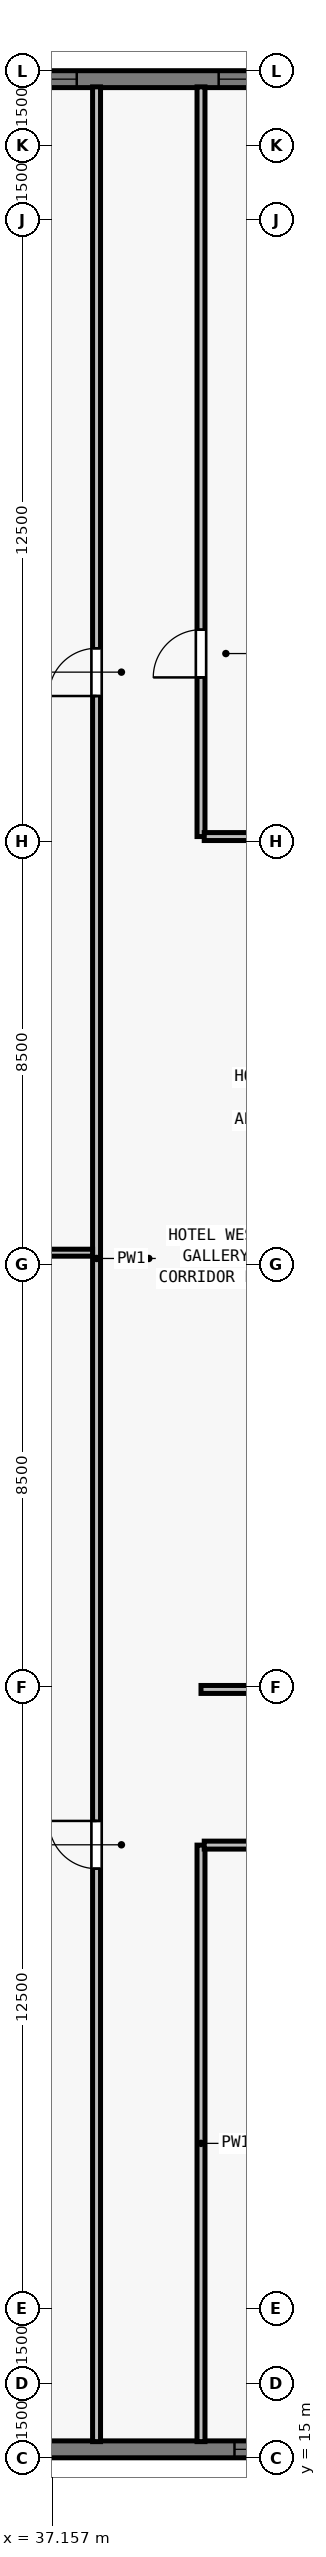
"""IFC4 building model, lengths in metres.
Left out: names, types, materials, properties, quantities, classifications, styles, units other than length and angle.
Written with IfcOpenShell. Run it as: python <this file> out.ifc"""

import sys

from ifc_helpers import new_model, si_unit, direction, frame, frame_2d, origin, place, context, subcontext, project, spatial, rectangle, extrude, element, fill, save


model = new_model("IFC4")
c1 = context("Model", 3, precision=1e-05, world=origin(), true_north=direction((0.0, 1.0)))
c2 = subcontext(c1, "Body", "Model", "MODEL_VIEW")
j1 = project(units=[si_unit("LENGTHUNIT", "METRE"), si_unit("PLANEANGLEUNIT", "RADIAN")], contexts=[c1])
p1 = place(None, origin())
s1 = spatial("IfcSite", under=j1, at=p1, CompositionType="ELEMENT")
p2 = place(p1, origin())
s2 = spatial("IfcBuilding", under=s1, at=p2, CompositionType="ELEMENT")
p3 = place(p2, frame((0.0, 0.0, 179.5)))
s3 = spatial("IfcBuildingStorey", under=s2, at=p3, CompositionType="ELEMENT", Elevation=179.5)
p4 = place(p3, frame((72.0, 15.17, 0.0), z_axis=(0.0, 0.0, 1.0), x_axis=(-1.0, 0.0, 0.0)))
e1 = element("IfcWall", 1, at=p4, inside=s3, PredefinedType="SOLIDWALL", context=c2, shape_type="SweptSolid", body=[
    extrude(rectangle(XDim=39.682, YDim=0.34, at=frame_2d((19.841, 0.0))), origin(), (0.0, 0.0, 1.0), 3.28),
])
p5 = place(p4, frame((11.859, 0.0, 0.8)))
e2 = element("IfcOpeningElement", 2, at=p5, cuts=e1, PredefinedType="OPENING", context=c2, shape_type="SweptSolid", body=[
    extrude(rectangle(XDim=1.75, YDim=1.66, at=frame_2d((0.875, 0.83))), frame((0.0, 0.18, 0.0), z_axis=(0.0, -1.0, 0.0), x_axis=(1.0, 0.0, 0.0)), (0.0, 0.0, 1.0), 0.36),
])
p6 = place(p4, frame((18.966, 0.0, 0.8)))
e3 = element("IfcOpeningElement", 3, at=p6, cuts=e1, PredefinedType="OPENING", context=c2, shape_type="SweptSolid", body=[
    extrude(rectangle(XDim=1.75, YDim=1.66, at=frame_2d((0.875, 0.83))), frame((0.0, 0.18, 0.0), z_axis=(0.0, -1.0, 0.0), x_axis=(1.0, 0.0, 0.0)), (0.0, 0.0, 1.0), 0.36),
])
p7 = place(p4, frame((22.27, 0.0, 0.8)))
e4 = element("IfcOpeningElement", 4, at=p7, cuts=e1, PredefinedType="OPENING", context=c2, shape_type="SweptSolid", body=[
    extrude(rectangle(XDim=1.35, YDim=1.66, at=frame_2d((0.675, 0.83))), frame((0.0, 0.18, 0.0), z_axis=(0.0, -1.0, 0.0), x_axis=(1.0, 0.0, 0.0)), (0.0, 0.0, 1.0), 0.36),
])
p8 = place(p4, frame((26.073, 0.0, 0.8)))
e5 = element("IfcOpeningElement", 5, at=p8, cuts=e1, PredefinedType="OPENING", context=c2, shape_type="SweptSolid", body=[
    extrude(rectangle(XDim=1.75, YDim=1.66, at=frame_2d((0.875, 0.83))), frame((0.0, 0.18, 0.0), z_axis=(0.0, -1.0, 0.0), x_axis=(1.0, 0.0, 0.0)), (0.0, 0.0, 1.0), 0.36),
])
p9 = place(p4, frame((29.827, 0.0, 0.8)))
e6 = element("IfcOpeningElement", 6, at=p9, cuts=e1, PredefinedType="OPENING", context=c2, shape_type="SweptSolid", body=[
    extrude(rectangle(XDim=1.35, YDim=1.66, at=frame_2d((0.675, 0.83))), frame((0.0, 0.18, 0.0), z_axis=(0.0, -1.0, 0.0), x_axis=(1.0, 0.0, 0.0)), (0.0, 0.0, 1.0), 0.36),
])
p10 = place(p3, frame((32.0, 62.83, 0.0), z_axis=(0.0, 0.0, 1.0), x_axis=(1.0, 0.0, 0.0)))
e7 = element("IfcWall", 7, at=p10, inside=s3, PredefinedType="SOLIDWALL", context=c2, shape_type="SweptSolid", body=[
    extrude(rectangle(XDim=39.682, YDim=0.34, at=frame_2d((19.841, 0.0))), origin(), (0.0, 0.0, 1.0), 3.28),
])
p11 = place(p10, frame((3.902, 0.0, 0.8)))
e8 = element("IfcOpeningElement", 8, at=p11, cuts=e7, PredefinedType="OPENING", context=c2, shape_type="SweptSolid", body=[
    extrude(rectangle(XDim=1.75, YDim=1.66, at=frame_2d((0.875, 0.83))), frame((0.0, 0.18, 0.0), z_axis=(0.0, -1.0, 0.0), x_axis=(1.0, 0.0, 0.0)), (0.0, 0.0, 1.0), 0.36),
])
p12 = place(p10, frame((8.505, 0.0, 0.8)))
e9 = element("IfcOpeningElement", 9, at=p12, cuts=e7, PredefinedType="OPENING", context=c2, shape_type="SweptSolid", body=[
    extrude(rectangle(XDim=1.35, YDim=1.66, at=frame_2d((0.675, 0.83))), frame((0.0, 0.18, 0.0), z_axis=(0.0, -1.0, 0.0), x_axis=(1.0, 0.0, 0.0)), (0.0, 0.0, 1.0), 0.36),
])
p13 = place(p10, frame((11.859, 0.0, 0.8)))
e10 = element("IfcOpeningElement", 10, at=p13, cuts=e7, PredefinedType="OPENING", context=c2, shape_type="SweptSolid", body=[
    extrude(rectangle(XDim=1.75, YDim=1.66, at=frame_2d((0.875, 0.83))), frame((0.0, 0.18, 0.0), z_axis=(0.0, -1.0, 0.0), x_axis=(1.0, 0.0, 0.0)), (0.0, 0.0, 1.0), 0.36),
])
p14 = place(p10, frame((16.062, 0.0, 0.8)))
e11 = element("IfcOpeningElement", 11, at=p14, cuts=e7, PredefinedType="OPENING", context=c2, shape_type="SweptSolid", body=[
    extrude(rectangle(XDim=1.35, YDim=1.66, at=frame_2d((0.675, 0.83))), frame((0.0, 0.18, 0.0), z_axis=(0.0, -1.0, 0.0), x_axis=(1.0, 0.0, 0.0)), (0.0, 0.0, 1.0), 0.36),
])
p15 = place(p10, frame((17.716, 0.0, 0.8)))
e12 = element("IfcOpeningElement", 12, at=p15, cuts=e7, PredefinedType="OPENING", context=c2, shape_type="SweptSolid", body=[
    extrude(rectangle(XDim=1.75, YDim=1.66, at=frame_2d((0.875, 0.83))), frame((0.0, 0.18, 0.0), z_axis=(0.0, -1.0, 0.0), x_axis=(1.0, 0.0, 0.0)), (0.0, 0.0, 1.0), 0.36),
])
p16 = place(p10, frame((22.719, 0.0, 0.8)))
e13 = element("IfcOpeningElement", 13, at=p16, cuts=e7, PredefinedType="OPENING", context=c2, shape_type="SweptSolid", body=[
    extrude(rectangle(XDim=1.35, YDim=1.66, at=frame_2d((0.675, 0.83))), frame((0.0, 0.18, 0.0), z_axis=(0.0, -1.0, 0.0), x_axis=(1.0, 0.0, 0.0)), (0.0, 0.0, 1.0), 0.36),
])
p17 = place(p10, frame((26.073, 0.0, 0.8)))
e14 = element("IfcOpeningElement", 14, at=p17, cuts=e7, PredefinedType="OPENING", context=c2, shape_type="SweptSolid", body=[
    extrude(rectangle(XDim=1.75, YDim=1.66, at=frame_2d((0.875, 0.83))), frame((0.0, 0.18, 0.0), z_axis=(0.0, -1.0, 0.0), x_axis=(1.0, 0.0, 0.0)), (0.0, 0.0, 1.0), 0.36),
])
p18 = place(p10, frame((30.677, 0.0, 0.8)))
e15 = element("IfcOpeningElement", 15, at=p18, cuts=e7, PredefinedType="OPENING", context=c2, shape_type="SweptSolid", body=[
    extrude(rectangle(XDim=1.35, YDim=1.66, at=frame_2d((0.675, 0.83))), frame((0.0, 0.18, 0.0), z_axis=(0.0, -1.0, 0.0), x_axis=(1.0, 0.0, 0.0)), (0.0, 0.0, 1.0), 0.36),
])
p19 = place(p10, frame((33.18, 0.0, 0.8)))
e16 = element("IfcOpeningElement", 16, at=p19, cuts=e7, PredefinedType="OPENING", context=c2, shape_type="SweptSolid", body=[
    extrude(rectangle(XDim=1.75, YDim=1.66, at=frame_2d((0.875, 0.83))), frame((0.0, 0.18, 0.0), z_axis=(0.0, -1.0, 0.0), x_axis=(1.0, 0.0, 0.0)), (0.0, 0.0, 1.0), 0.36),
])
p20 = place(p3, frame((38.05, 15.325, 0.0), z_axis=(0.0, 0.0, 1.0), x_axis=(0.0, 1.0, 0.0)))
e17 = element("IfcWall", 17, at=p20, inside=s3, PredefinedType="PARTITIONING", context=c2, shape_type="SweptSolid", body=[
    extrude(rectangle(XDim=47.35, YDim=0.16, at=frame_2d((23.675, 0.0))), origin(), (0.0, 0.0, 1.0), 2.555),
])
p21 = place(p20, frame((11.521, 0.0, 0.0)))
e18 = element("IfcOpeningElement", 18, at=p21, cuts=e17, PredefinedType="OPENING", context=c2, shape_type="SweptSolid", body=[
    extrude(rectangle(XDim=0.96, YDim=2.12, at=frame_2d((0.48, 1.06))), frame((0.0, 0.09, 0.0), z_axis=(0.0, -1.0, 0.0), x_axis=(1.0, 0.0, 0.0)), (0.0, 0.0, 1.0), 0.18),
])
p22 = place(p20, frame((35.101, 0.0, 0.0)))
e19 = element("IfcOpeningElement", 19, at=p22, cuts=e17, PredefinedType="OPENING", context=c2, shape_type="SweptSolid", body=[
    extrude(rectangle(XDim=0.96, YDim=2.12, at=frame_2d((0.48, 1.06))), frame((0.0, 0.09, 0.0), z_axis=(0.0, -1.0, 0.0), x_axis=(1.0, 0.0, 0.0)), (0.0, 0.0, 1.0), 0.18),
])
p23 = place(p3, frame((40.15, 15.325, 0.0), z_axis=(0.0, 0.0, 1.0), x_axis=(0.0, 1.0, 0.0)))
e20 = element("IfcWall", 20, at=p23, inside=s3, PredefinedType="PARTITIONING", context=c2, shape_type="SweptSolid", body=[
    extrude(rectangle(XDim=11.995, YDim=0.16, at=frame_2d((5.998, 0.0))), origin(), (0.0, 0.0, 1.0), 2.555),
])
p24 = place(p3, frame((40.15, 47.6, 0.0), z_axis=(0.0, 0.0, 1.0), x_axis=(0.0, 1.0, 0.0)))
e21 = element("IfcWall", 21, at=p24, inside=s3, PredefinedType="PARTITIONING", context=c2, shape_type="SweptSolid", body=[
    extrude(rectangle(XDim=15.075, YDim=0.16, at=frame_2d((7.538, 0.0))), origin(), (0.0, 0.0, 1.0), 2.555),
])
p25 = place(p24, frame((3.2, 0.0, 0.0)))
e22 = element("IfcOpeningElement", 22, at=p25, cuts=e21, PredefinedType="OPENING", context=c2, shape_type="SweptSolid", body=[
    extrude(rectangle(XDim=0.96, YDim=2.12, at=frame_2d((0.48, 1.06))), frame((0.0, 0.09, 0.0), z_axis=(0.0, -1.0, 0.0), x_axis=(1.0, 0.0, 0.0)), (0.0, 0.0, 1.0), 0.18),
])
p26 = place(p3, frame((40.15, 30.45, 0.0), z_axis=(0.0, 0.0, 1.0), x_axis=(1.0, 0.0, 0.0)))
e23 = element("IfcWall", 23, at=p26, inside=s3, PredefinedType="PARTITIONING", context=c2, shape_type="SweptSolid", body=[
    extrude(rectangle(XDim=3.085, YDim=0.16, at=frame_2d((1.542, 0.0))), origin(), (0.0, 0.0, 1.0), 3.28),
])
p27 = place(p3, frame((40.215, 47.6, 0.0), z_axis=(0.0, 0.0, 1.0), x_axis=(1.0, 0.0, 0.0)))
e24 = element("IfcWall", 24, at=p27, inside=s3, PredefinedType="PARTITIONING", context=c2, shape_type="SweptSolid", body=[
    extrude(rectangle(XDim=3.02, YDim=0.16, at=frame_2d((1.51, 0.0))), origin(), (0.0, 0.0, 1.0), 3.28),
])
p28 = place(p3, frame((40.215, 27.32, 0.0), z_axis=(0.0, 0.0, 1.0), x_axis=(1.0, 0.0, 0.0)))
e25 = element("IfcWall", 25, at=p28, inside=s3, PredefinedType="PARTITIONING", context=c2, shape_type="SweptSolid", body=[
    extrude(rectangle(XDim=22.07, YDim=0.16, at=frame_2d((11.035, 0.0))), origin(), (0.0, 0.0, 1.0), 3.28),
])
p29 = place(p28, frame((3.587, 0.0, 0.0)))
e26 = element("IfcOpeningElement", 26, at=p29, cuts=e25, PredefinedType="OPENING", context=c2, shape_type="SweptSolid", body=[
    extrude(rectangle(XDim=0.96, YDim=2.12, at=frame_2d((0.48, 1.06))), frame((0.0, 0.09, 0.0), z_axis=(0.0, -1.0, 0.0), x_axis=(1.0, 0.0, 0.0)), (0.0, 0.0, 1.0), 0.18),
])
p30 = place(p28, frame((10.61, 0.0, 0.0)))
e27 = element("IfcOpeningElement", 27, at=p30, cuts=e25, PredefinedType="OPENING", context=c2, shape_type="SweptSolid", body=[
    extrude(rectangle(XDim=0.96, YDim=2.12, at=frame_2d((0.48, 1.06))), frame((0.0, 0.09, 0.0), z_axis=(0.0, -1.0, 0.0), x_axis=(1.0, 0.0, 0.0)), (0.0, 0.0, 1.0), 0.18),
])
p31 = place(p28, frame((17.578, 0.0, 0.0)))
e28 = element("IfcOpeningElement", 28, at=p31, cuts=e25, PredefinedType="OPENING", context=c2, shape_type="SweptSolid", body=[
    extrude(rectangle(XDim=0.96, YDim=2.12, at=frame_2d((0.48, 1.06))), frame((0.0, 0.09, 0.0), z_axis=(0.0, -1.0, 0.0), x_axis=(1.0, 0.0, 0.0)), (0.0, 0.0, 1.0), 0.18),
])
p32 = place(p3, frame((28.42, 39.232, 0.0), z_axis=(0.0, 0.0, 1.0), x_axis=(1.0, 0.0, 0.0)))
e29 = element("IfcWall", 29, at=p32, inside=s3, PredefinedType="PARTITIONING", context=c2, shape_type="SweptSolid", body=[
    extrude(rectangle(XDim=9.55, YDim=0.14, at=frame_2d((4.775, 0.0))), origin(), (0.0, 0.0, 1.0), 2.896),
])
p33 = place(p9, origin())
e30 = element("IfcWindow", 30, at=p33, inside=s3, PartitioningType="SINGLE_PANEL", PredefinedType="WINDOW", context=c2, shape_type="SweptSolid", body=[
    extrude(rectangle(XDim=1.35, YDim=1.66, at=frame_2d((0.675, 0.83))), frame((0.0, -0.05, 0.0), z_axis=(0.0, -1.0, 0.0), x_axis=(1.0, 0.0, 0.0)), (0.0, 0.0, 1.0), 0.06),
])
fill(e6, e30)
p34 = place(p11, origin())
e31 = element("IfcWindow", 31, at=p34, inside=s3, PartitioningType="SINGLE_PANEL", PredefinedType="WINDOW", context=c2, shape_type="SweptSolid", body=[
    extrude(rectangle(XDim=1.75, YDim=1.66, at=frame_2d((0.875, 0.83))), frame((0.0, -0.05, 0.0), z_axis=(0.0, -1.0, 0.0), x_axis=(1.0, 0.0, 0.0)), (0.0, 0.0, 1.0), 0.06),
])
fill(e8, e31)
p35 = place(p12, origin())
e32 = element("IfcWindow", 32, at=p35, inside=s3, PartitioningType="SINGLE_PANEL", PredefinedType="WINDOW", context=c2, shape_type="SweptSolid", body=[
    extrude(rectangle(XDim=1.35, YDim=1.66, at=frame_2d((0.675, 0.83))), frame((0.0, -0.05, 0.0), z_axis=(0.0, -1.0, 0.0), x_axis=(1.0, 0.0, 0.0)), (0.0, 0.0, 1.0), 0.06),
])
fill(e9, e32)
p36 = place(p25, origin())
e33 = element("IfcDoor", 33, at=p36, inside=s3, OperationType="SINGLE_SWING_LEFT", PredefinedType="DOOR", context=c2, shape_type="SweptSolid", body=[
    extrude(rectangle(XDim=0.96, YDim=2.12, at=frame_2d((0.48, 1.06))), frame((0.0, 0.025, 0.0), z_axis=(0.0, -1.0, 0.0), x_axis=(1.0, 0.0, 0.0)), (0.0, 0.0, 1.0), 0.05),
])
fill(e22, e33)
p37 = place(p21, origin())
e34 = element("IfcDoor", 34, at=p37, inside=s3, OperationType="SINGLE_SWING_RIGHT", PredefinedType="DOOR", context=c2, shape_type="SweptSolid", body=[
    extrude(rectangle(XDim=0.96, YDim=2.12, at=frame_2d((0.48, 1.06))), frame((0.0, 0.025, 0.0), z_axis=(0.0, -1.0, 0.0), x_axis=(1.0, 0.0, 0.0)), (0.0, 0.0, 1.0), 0.05),
])
fill(e18, e34)
p38 = place(p22, origin())
e35 = element("IfcDoor", 35, at=p38, inside=s3, OperationType="SINGLE_SWING_LEFT", PredefinedType="DOOR", context=c2, shape_type="SweptSolid", body=[
    extrude(rectangle(XDim=0.96, YDim=2.12, at=frame_2d((0.48, 1.06))), frame((0.0, 0.025, 0.0), z_axis=(0.0, -1.0, 0.0), x_axis=(1.0, 0.0, 0.0)), (0.0, 0.0, 1.0), 0.05),
])
fill(e19, e35)
save(model, sys.argv[1])
